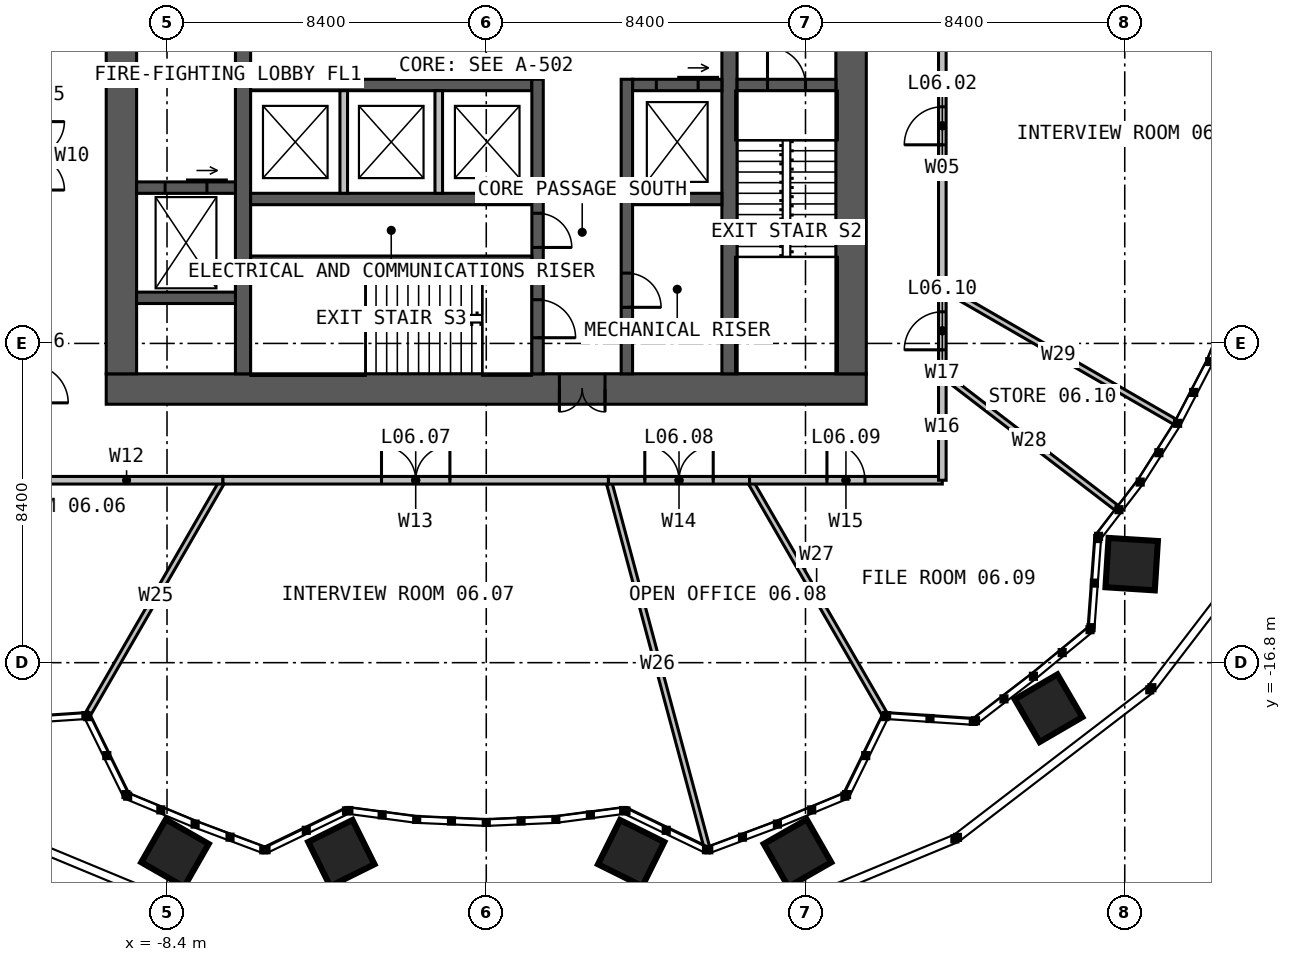
"""IFC4 building model, lengths in metres.
Left out: names, types, materials, properties, quantities, classifications, styles, units other than length and angle.
Written with IfcOpenShell. Run it as: python <this file> out.ifc"""

import sys

from ifc_helpers import new_model, si_unit, direction, frame, frame_2d, origin, place, context, subcontext, project, spatial, rectangle, extrude, element, fill, save


model = new_model("IFC4")
c1 = context("Model", 3, precision=1e-05, world=origin(), true_north=direction((0.0, 1.0)))
c2 = subcontext(c1, "Body", "Model", "MODEL_VIEW")
j1 = project(units=[si_unit("LENGTHUNIT", "METRE"), si_unit("PLANEANGLEUNIT", "RADIAN")], contexts=[c1])
p1 = place(None, origin())
s1 = spatial("IfcSite", under=j1, at=p1, CompositionType="ELEMENT")
p2 = place(p1, origin())
s2 = spatial("IfcBuilding", under=s1, at=p2, CompositionType="ELEMENT")
p3 = place(p2, frame((0.0, 0.0, 29.0)))
s3 = spatial("IfcBuildingStorey", under=s2, at=p3, CompositionType="ELEMENT", Elevation=29.0)
p4 = place(p3, frame((10.0, -9.6, 0.0), z_axis=(0.0, 0.0, 1.0), x_axis=(-1.0, 0.0, 0.0)))
e1 = element("IfcWall", 1, at=p4, inside=s3, PredefinedType="SOLIDWALL", context=c2, shape_type="SweptSolid", body=[
    extrude(rectangle(XDim=20.0, YDim=0.8, at=frame_2d((10.0, 0.0))), origin(), (0.0, 0.0, 1.0), 4.0),
])
p5 = place(p4, frame((6.875, 0.0, 0.0)))
e2 = element("IfcOpeningElement", 2, at=p5, cuts=e1, PredefinedType="OPENING", context=c2, shape_type="SweptSolid", body=[
    extrude(rectangle(XDim=1.2, YDim=2.2, at=frame_2d((0.6, 1.1))), frame((0.0, 0.41, 0.0), z_axis=(0.0, -1.0, 0.0), x_axis=(1.0, 0.0, 0.0)), (0.0, 0.0, 1.0), 0.82),
])
for number, where, z_axis, x_axis in (
    (3, (9.6, -9.2, 0.0), (0.0, 0.0, 1.0), (0.0, 1.0, 0.0)),
    (4, (-9.6, 9.2, 0.0), (0.0, 0.0, 1.0), (0.0, -1.0, 0.0)),
):
    element("IfcWall", number, at=place(p3, frame(where, z_axis=z_axis, x_axis=x_axis)), inside=s3, PredefinedType="SOLIDWALL", context=c2, shape_type="SweptSolid", body=[
        extrude(rectangle(XDim=18.4, YDim=0.8, at=frame_2d((9.2, 0.0))), origin(), (0.0, 0.0, 1.0), 4.0),
    ])
p6 = place(p3, frame((-6.4, -9.2, 0.0), z_axis=(0.0, 0.0, 1.0), x_axis=(0.0, 1.0, 0.0)))
e5 = element("IfcWall", 5, at=p6, inside=s3, PredefinedType="SOLIDWALL", context=c2, shape_type="SweptSolid", body=[
    extrude(rectangle(XDim=18.4, YDim=0.4, at=frame_2d((9.2, 0.0))), origin(), (0.0, 0.0, 1.0), 4.0),
])
p7 = place(p6, frame((8.7, 0.0, 0.0)))
e6 = element("IfcOpeningElement", 6, at=p7, cuts=e5, PredefinedType="OPENING", context=c2, shape_type="SweptSolid", body=[
    extrude(rectangle(XDim=1.0, YDim=2.2, at=frame_2d((0.5, 1.1))), frame((0.0, 0.21, 0.0), z_axis=(0.0, -1.0, 0.0), x_axis=(1.0, 0.0, 0.0)), (0.0, 0.0, 1.0), 0.42),
])
p8 = place(p3, frame((6.4, 9.2, 0.0), z_axis=(0.0, 0.0, 1.0), x_axis=(0.0, -1.0, 0.0)))
e7 = element("IfcWall", 7, at=p8, inside=s3, PredefinedType="SOLIDWALL", context=c2, shape_type="SweptSolid", body=[
    extrude(rectangle(XDim=18.4, YDim=0.4, at=frame_2d((9.2, 0.0))), origin(), (0.0, 0.0, 1.0), 4.0),
])
p9 = place(p8, frame((8.7, 0.0, 0.0)))
e8 = element("IfcOpeningElement", 8, at=p9, cuts=e7, PredefinedType="OPENING", context=c2, shape_type="SweptSolid", body=[
    extrude(rectangle(XDim=1.0, YDim=2.2, at=frame_2d((0.5, 1.1))), frame((0.0, 0.21, 0.0), z_axis=(0.0, -1.0, 0.0), x_axis=(1.0, 0.0, 0.0)), (0.0, 0.0, 1.0), 0.42),
])
p10 = place(p3, frame((-6.2, -1.6, 0.0), z_axis=(0.0, 0.0, 1.0), x_axis=(1.0, 0.0, 0.0)))
e9 = element("IfcWall", 9, at=p10, inside=s3, PredefinedType="SOLIDWALL", context=c2, shape_type="SweptSolid", body=[
    extrude(rectangle(XDim=7.4, YDim=0.3, at=frame_2d((3.7, 0.0))), origin(), (0.0, 0.0, 1.0), 4.0),
])
p11 = place(p3, frame((3.85, -1.6, 0.0), z_axis=(0.0, 0.0, 1.0), x_axis=(1.0, 0.0, 0.0)))
e10 = element("IfcWall", 10, at=p11, inside=s3, PredefinedType="SOLIDWALL", context=c2, shape_type="SweptSolid", body=[
    extrude(rectangle(XDim=2.35, YDim=0.3, at=frame_2d((1.175, 0.0))), origin(), (0.0, 0.0, 1.0), 4.0),
])
p12 = place(p11, frame((0.625, 0.0, 0.0)))
e11 = element("IfcOpeningElement", 11, at=p12, cuts=e10, PredefinedType="OPENING", context=c2, shape_type="SweptSolid", body=[
    extrude(rectangle(XDim=1.1, YDim=2.2, at=frame_2d((0.55, 1.1))), frame((0.0, 0.16, 0.0), z_axis=(0.0, -1.0, 0.0), x_axis=(1.0, 0.0, 0.0)), (0.0, 0.0, 1.0), 0.32),
])
p13 = place(p3, frame((-6.2, -4.6, 0.0), z_axis=(0.0, 0.0, 1.0), x_axis=(1.0, 0.0, 0.0)))
e12 = element("IfcWall", 12, at=p13, inside=s3, PredefinedType="SOLIDWALL", context=c2, shape_type="SweptSolid", body=[
    extrude(rectangle(XDim=7.4, YDim=0.3, at=frame_2d((3.7, 0.0))), origin(), (0.0, 0.0, 1.0), 4.0),
])
p14 = place(p3, frame((3.85, -4.6, 0.0), z_axis=(0.0, 0.0, 1.0), x_axis=(1.0, 0.0, 0.0)))
e13 = element("IfcWall", 13, at=p14, inside=s3, PredefinedType="SOLIDWALL", context=c2, shape_type="SweptSolid", body=[
    extrude(rectangle(XDim=2.35, YDim=0.3, at=frame_2d((1.175, 0.0))), origin(), (0.0, 0.0, 1.0), 4.0),
])
p15 = place(p3, frame((1.35, -1.45, 0.0), z_axis=(0.0, 0.0, 1.0), x_axis=(0.0, -1.0, 0.0)))
e14 = element("IfcWall", 14, at=p15, inside=s3, PredefinedType="SOLIDWALL", context=c2, shape_type="SweptSolid", body=[
    extrude(rectangle(XDim=7.75, YDim=0.3, at=frame_2d((3.875, 0.0))), origin(), (0.0, 0.0, 1.0), 4.0),
])
p16 = place(p15, frame((5.8, 0.0, 0.0)))
e15 = element("IfcOpeningElement", 15, at=p16, cuts=e14, PredefinedType="OPENING", context=c2, shape_type="SweptSolid", body=[
    extrude(rectangle(XDim=1.0, YDim=2.2, at=frame_2d((0.5, 1.1))), frame((0.0, 0.16, 0.0), z_axis=(0.0, -1.0, 0.0), x_axis=(1.0, 0.0, 0.0)), (0.0, 0.0, 1.0), 0.32),
])
p17 = place(p15, frame((3.525, 0.0, 0.0)))
e16 = element("IfcOpeningElement", 16, at=p17, cuts=e14, PredefinedType="OPENING", context=c2, shape_type="SweptSolid", body=[
    extrude(rectangle(XDim=0.9, YDim=2.2, at=frame_2d((0.45, 1.1))), frame((0.0, 0.16, 0.0), z_axis=(0.0, -1.0, 0.0), x_axis=(1.0, 0.0, 0.0)), (0.0, 0.0, 1.0), 0.32),
])
p18 = place(p3, frame((3.7, -1.45, 0.0), z_axis=(0.0, 0.0, 1.0), x_axis=(0.0, -1.0, 0.0)))
e17 = element("IfcWall", 17, at=p18, inside=s3, PredefinedType="SOLIDWALL", context=c2, shape_type="SweptSolid", body=[
    extrude(rectangle(XDim=7.75, YDim=0.3, at=frame_2d((3.875, 0.0))), origin(), (0.0, 0.0, 1.0), 4.0),
])
p19 = place(p18, frame((5.1, 0.0, 0.0)))
e18 = element("IfcOpeningElement", 18, at=p19, cuts=e17, PredefinedType="OPENING", context=c2, shape_type="SweptSolid", body=[
    extrude(rectangle(XDim=0.9, YDim=2.2, at=frame_2d((0.45, 1.1))), frame((0.0, 0.16, 0.0), z_axis=(0.0, -1.0, 0.0), x_axis=(1.0, 0.0, 0.0)), (0.0, 0.0, 1.0), 0.32),
])
p20 = place(p3, frame((-6.2, -6.2, 0.0), z_axis=(0.0, 0.0, 1.0), x_axis=(1.0, 0.0, 0.0)))
e19 = element("IfcWall", 19, at=p20, inside=s3, PredefinedType="SOLIDWALL", context=c2, shape_type="SweptSolid", body=[
    extrude(rectangle(XDim=7.4, YDim=0.2, at=frame_2d((3.7, 0.0))), origin(), (0.0, 0.0, 1.0), 4.0),
])
p21 = place(p3, frame((6.6, -1.6, 0.0), z_axis=(0.0, 0.0, 1.0), x_axis=(1.0, 0.0, 0.0)))
e20 = element("IfcWall", 20, at=p21, inside=s3, PredefinedType="SOLIDWALL", context=c2, shape_type="SweptSolid", body=[
    extrude(rectangle(XDim=2.6, YDim=0.3, at=frame_2d((1.3, 0.0))), origin(), (0.0, 0.0, 1.0), 4.0),
])
p22 = place(p21, frame((0.8, 0.0, 0.0)))
e21 = element("IfcOpeningElement", 21, at=p22, cuts=e20, PredefinedType="OPENING", context=c2, shape_type="SweptSolid", body=[
    extrude(rectangle(XDim=1.0, YDim=2.2, at=frame_2d((0.5, 1.1))), frame((0.0, 0.16, 0.0), z_axis=(0.0, -1.0, 0.0), x_axis=(1.0, 0.0, 0.0)), (0.0, 0.0, 1.0), 0.32),
])
p23 = place(p3, frame((-9.2, -4.3, 0.0), z_axis=(0.0, 0.0, 1.0), x_axis=(1.0, 0.0, 0.0)))
e22 = element("IfcWall", 22, at=p23, inside=s3, PredefinedType="SOLIDWALL", context=c2, shape_type="SweptSolid", body=[
    extrude(rectangle(XDim=2.6, YDim=0.3, at=frame_2d((1.3, 0.0))), origin(), (0.0, 0.0, 1.0), 4.0),
])
p24 = place(p23, frame((0.75, 0.0, 0.0)))
e23 = element("IfcOpeningElement", 23, at=p24, cuts=e22, PredefinedType="OPENING", context=c2, shape_type="SweptSolid", body=[
    extrude(rectangle(XDim=1.1, YDim=2.2, at=frame_2d((0.55, 1.1))), frame((0.0, 0.16, 0.0), z_axis=(0.0, -1.0, 0.0), x_axis=(1.0, 0.0, 0.0)), (0.0, 0.0, 1.0), 0.32),
])
p25 = place(p3, frame((-9.2, -7.2, 0.0), z_axis=(0.0, 0.0, 1.0), x_axis=(1.0, 0.0, 0.0)))
e24 = element("IfcWall", 24, at=p25, inside=s3, PredefinedType="SOLIDWALL", context=c2, shape_type="SweptSolid", body=[
    extrude(rectangle(XDim=2.6, YDim=0.3, at=frame_2d((1.3, 0.0))), origin(), (0.0, 0.0, 1.0), 4.0),
])
for number, where, z_axis, x_axis in (
    (25, (-3.75, -1.75, 0.0), (0.0, 0.0, 1.0), (0.0, -1.0, 0.0)),
    (26, (-1.25, -1.75, 0.0), (0.0, 0.0, 1.0), (0.0, -1.0, 0.0)),
):
    element("IfcWall", number, at=place(p3, frame(where, z_axis=z_axis, x_axis=x_axis)), inside=s3, PredefinedType="SOLIDWALL", context=c2, shape_type="SweptSolid", body=[
        extrude(rectangle(XDim=2.7, YDim=0.2, at=frame_2d((1.35, 0.0))), origin(), (0.0, 0.0, 1.0), 3.75),
    ])
for number, where, z_axis, x_axis in (
    (27, (12.0, -6.928, 0.0), (0.0, 0.0, 1.0), (0.866, -0.5, 0.0)),
    (28, (-6.928, -12.0, 0.0), (0.0, 0.0, 1.0), (-0.5, -0.866, 0.0)),
):
    element("IfcWall", number, at=place(p3, frame(where, z_axis=z_axis, x_axis=x_axis)), inside=s3, PredefinedType="PARTITIONING", context=c2, shape_type="SweptSolid", body=[
        extrude(rectangle(XDim=7.057, YDim=0.15, at=frame_2d((3.529, 0.0))), origin(), (0.0, 0.0, 1.0), 2.79),
    ])
p26 = place(p3, frame((3.215, -12.0, 0.0), z_axis=(0.0, 0.0, 1.0), x_axis=(0.258824874955, -0.965924264166, 0.0)))
e29 = element("IfcWall", 29, at=p26, inside=s3, PredefinedType="PARTITIONING", context=c2, shape_type="SweptSolid", body=[
    extrude(rectangle(XDim=9.987, YDim=0.15, at=frame_2d((4.994, 0.0))), origin(), (0.0, 0.0, 1.0), 2.79),
])
p27 = place(p3, frame((6.928, -12.0, 0.0), z_axis=(0.0, 0.0, 1.0), x_axis=(0.500004948271, -0.86602254688, 0.0)))
e30 = element("IfcWall", 30, at=p27, inside=s3, PredefinedType="PARTITIONING", context=c2, shape_type="SweptSolid", body=[
    extrude(rectangle(XDim=7.057, YDim=0.15, at=frame_2d((3.529, 0.0))), origin(), (0.0, 0.0, 1.0), 2.79),
])
p28 = place(p3, frame((12.0, -9.208, 0.0), z_axis=(0.0, 0.0, 1.0), x_axis=(0.793353539316, -0.608761169634, 0.0)))
e31 = element("IfcWall", 31, at=p28, inside=s3, PredefinedType="PARTITIONING", context=c2, shape_type="SweptSolid", body=[
    extrude(rectangle(XDim=5.768, YDim=0.15, at=frame_2d((2.884, 0.0))), origin(), (0.0, 0.0, 1.0), 2.79),
])
p29 = place(p3, frame((12.0, -6.928, 0.0), z_axis=(0.0, 0.0, 1.0), x_axis=(0.0, 1.0, 0.0)))
e32 = element("IfcWall", 32, at=p29, inside=s3, PredefinedType="PARTITIONING", context=c2, shape_type="SweptSolid", body=[
    extrude(rectangle(XDim=8.508, YDim=0.2, at=frame_2d((4.254, 0.0))), origin(), (0.0, 0.0, 1.0), 3.8),
])
p30 = place(p29, frame((3.754, 0.0, 0.0)))
e33 = element("IfcOpeningElement", 33, at=p30, cuts=e32, PredefinedType="OPENING", context=c2, shape_type="SweptSolid", body=[
    extrude(rectangle(XDim=1.0, YDim=2.2, at=frame_2d((0.5, 1.1))), frame((0.0, 0.11, 0.0), z_axis=(0.0, -1.0, 0.0), x_axis=(1.0, 0.0, 0.0)), (0.0, 0.0, 1.0), 0.22),
])
p31 = place(p3, frame((-12.0, -12.0, 0.0), z_axis=(0.0, 0.0, 1.0), x_axis=(1.0, 0.0, 0.0)))
e34 = element("IfcWall", 34, at=p31, inside=s3, PredefinedType="PARTITIONING", context=c2, shape_type="SweptSolid", body=[
    extrude(rectangle(XDim=5.072, YDim=0.2, at=frame_2d((2.536, 0.0))), origin(), (0.0, 0.0, 1.0), 3.8),
])
p32 = place(p3, frame((-6.928, -12.0, 0.0), z_axis=(0.0, 0.0, 1.0), x_axis=(1.0, 0.0, 0.0)))
e35 = element("IfcWall", 35, at=p32, inside=s3, PredefinedType="PARTITIONING", context=c2, shape_type="SweptSolid", body=[
    extrude(rectangle(XDim=10.144, YDim=0.2, at=frame_2d((5.072, 0.0))), origin(), (0.0, 0.0, 1.0), 3.8),
])
p33 = place(p32, frame((4.172, 0.0, 0.0)))
e36 = element("IfcOpeningElement", 36, at=p33, cuts=e35, PredefinedType="OPENING", context=c2, shape_type="SweptSolid", body=[
    extrude(rectangle(XDim=1.8, YDim=2.2, at=frame_2d((0.9, 1.1))), frame((0.0, 0.11, 0.0), z_axis=(0.0, -1.0, 0.0), x_axis=(1.0, 0.0, 0.0)), (0.0, 0.0, 1.0), 0.22),
])
p34 = place(p3, frame((3.215, -12.0, 0.0), z_axis=(0.0, 0.0, 1.0), x_axis=(1.0, 0.0, 0.0)))
e37 = element("IfcWall", 37, at=p34, inside=s3, PredefinedType="PARTITIONING", context=c2, shape_type="SweptSolid", body=[
    extrude(rectangle(XDim=3.713, YDim=0.2, at=frame_2d((1.856, 0.0))), origin(), (0.0, 0.0, 1.0), 3.8),
])
p35 = place(p34, frame((0.956, 0.0, 0.0)))
e38 = element("IfcOpeningElement", 38, at=p35, cuts=e37, PredefinedType="OPENING", context=c2, shape_type="SweptSolid", body=[
    extrude(rectangle(XDim=1.8, YDim=2.2, at=frame_2d((0.9, 1.1))), frame((0.0, 0.11, 0.0), z_axis=(0.0, -1.0, 0.0), x_axis=(1.0, 0.0, 0.0)), (0.0, 0.0, 1.0), 0.22),
])
p36 = place(p3, frame((6.928, -12.0, 0.0), z_axis=(0.0, 0.0, 1.0), x_axis=(1.0, 0.0, 0.0)))
e39 = element("IfcWall", 39, at=p36, inside=s3, PredefinedType="PARTITIONING", context=c2, shape_type="SweptSolid", body=[
    extrude(rectangle(XDim=5.072, YDim=0.2, at=frame_2d((2.536, 0.0))), origin(), (0.0, 0.0, 1.0), 3.8),
])
p37 = place(p36, frame((2.036, 0.0, 0.0)))
e40 = element("IfcOpeningElement", 40, at=p37, cuts=e39, PredefinedType="OPENING", context=c2, shape_type="SweptSolid", body=[
    extrude(rectangle(XDim=1.0, YDim=2.2, at=frame_2d((0.5, 1.1))), frame((0.0, 0.11, 0.0), z_axis=(0.0, -1.0, 0.0), x_axis=(1.0, 0.0, 0.0)), (0.0, 0.0, 1.0), 0.22),
])
p38 = place(p3, frame((12.0, -12.0, 0.0), z_axis=(0.0, 0.0, 1.0), x_axis=(0.0, 1.0, 0.0)))
e41 = element("IfcWall", 41, at=p38, inside=s3, PredefinedType="PARTITIONING", context=c2, shape_type="SweptSolid", body=[
    extrude(rectangle(XDim=2.792, YDim=0.2, at=frame_2d((1.396, 0.0))), origin(), (0.0, 0.0, 1.0), 3.8),
])
p39 = place(p3, frame((12.0, -9.208, 0.0), z_axis=(0.0, 0.0, 1.0), x_axis=(0.0, 1.0, 0.0)))
e42 = element("IfcWall", 42, at=p39, inside=s3, PredefinedType="PARTITIONING", context=c2, shape_type="SweptSolid", body=[
    extrude(rectangle(XDim=2.28, YDim=0.2, at=frame_2d((1.14, 0.0))), origin(), (0.0, 0.0, 1.0), 3.8),
])
p40 = place(p39, frame((0.64, 0.0, 0.0)))
e43 = element("IfcOpeningElement", 43, at=p40, cuts=e42, PredefinedType="OPENING", context=c2, shape_type="SweptSolid", body=[
    extrude(rectangle(XDim=1.0, YDim=2.2, at=frame_2d((0.5, 1.1))), frame((0.0, 0.11, 0.0), z_axis=(0.0, -1.0, 0.0), x_axis=(1.0, 0.0, 0.0)), (0.0, 0.0, 1.0), 0.22),
])
p41 = place(p5, origin())
e44 = element("IfcDoor", 44, at=p41, inside=s3, OperationType="DOUBLE_DOOR_SINGLE_SWING", PredefinedType="DOOR", context=c2, shape_type="SweptSolid", body=[
    extrude(rectangle(XDim=1.2, YDim=2.2, at=frame_2d((0.6, 1.1))), frame((0.0, 0.025, 0.0), z_axis=(0.0, -1.0, 0.0), x_axis=(1.0, 0.0, 0.0)), (0.0, 0.0, 1.0), 0.05),
])
fill(e2, e44)
p42 = place(p22, origin())
e45 = element("IfcDoor", 45, at=p42, inside=s3, OperationType="SINGLE_SWING_LEFT", PredefinedType="DOOR", context=c2, shape_type="SweptSolid", body=[
    extrude(rectangle(XDim=1.0, YDim=2.2, at=frame_2d((0.5, 1.1))), frame((0.0, 0.025, 0.0), z_axis=(0.0, -1.0, 0.0), x_axis=(1.0, 0.0, 0.0)), (0.0, 0.0, 1.0), 0.05),
])
fill(e21, e45)
p43 = place(p16, origin())
e46 = element("IfcDoor", 46, at=p43, inside=s3, OperationType="SINGLE_SWING_RIGHT", PredefinedType="DOOR", context=c2, shape_type="SweptSolid", body=[
    extrude(rectangle(XDim=1.0, YDim=2.2, at=frame_2d((0.5, 1.1))), frame((0.0, 0.025, 0.0), z_axis=(0.0, -1.0, 0.0), x_axis=(1.0, 0.0, 0.0)), (0.0, 0.0, 1.0), 0.05),
])
fill(e15, e46)
p44 = place(p17, origin())
e47 = element("IfcDoor", 47, at=p44, inside=s3, OperationType="SINGLE_SWING_RIGHT", PredefinedType="DOOR", context=c2, shape_type="SweptSolid", body=[
    extrude(rectangle(XDim=0.9, YDim=2.2, at=frame_2d((0.45, 1.1))), frame((0.0, 0.025, 0.0), z_axis=(0.0, -1.0, 0.0), x_axis=(1.0, 0.0, 0.0)), (0.0, 0.0, 1.0), 0.05),
])
fill(e16, e47)
p45 = place(p19, origin())
e48 = element("IfcDoor", 48, at=p45, inside=s3, OperationType="SINGLE_SWING_RIGHT", PredefinedType="DOOR", context=c2, shape_type="SweptSolid", body=[
    extrude(rectangle(XDim=0.9, YDim=2.2, at=frame_2d((0.45, 1.1))), frame((0.0, 0.025, 0.0), z_axis=(0.0, -1.0, 0.0), x_axis=(1.0, 0.0, 0.0)), (0.0, 0.0, 1.0), 0.05),
])
fill(e18, e48)
p46 = place(p12, origin())
e49 = element("IfcDoor", 49, at=p46, inside=s3, OperationType="SLIDING_TO_LEFT", PredefinedType="DOOR", context=c2, shape_type="SweptSolid", body=[
    extrude(rectangle(XDim=1.1, YDim=2.2, at=frame_2d((0.55, 1.1))), frame((0.0, 0.025, 0.0), z_axis=(0.0, -1.0, 0.0), x_axis=(1.0, 0.0, 0.0)), (0.0, 0.0, 1.0), 0.05),
])
fill(e11, e49)
p47 = place(p24, origin())
e50 = element("IfcDoor", 50, at=p47, inside=s3, OperationType="SLIDING_TO_LEFT", PredefinedType="DOOR", context=c2, shape_type="SweptSolid", body=[
    extrude(rectangle(XDim=1.1, YDim=2.2, at=frame_2d((0.55, 1.1))), frame((0.0, 0.025, 0.0), z_axis=(0.0, -1.0, 0.0), x_axis=(1.0, 0.0, 0.0)), (0.0, 0.0, 1.0), 0.05),
])
fill(e23, e50)
p48 = place(p30, origin())
e51 = element("IfcDoor", 51, at=p48, inside=s3, OperationType="SINGLE_SWING_LEFT", PredefinedType="DOOR", context=c2, shape_type="SweptSolid", body=[
    extrude(rectangle(XDim=1.0, YDim=2.2, at=frame_2d((0.5, 1.1))), frame((0.0, 0.025, 0.0), z_axis=(0.0, -1.0, 0.0), x_axis=(1.0, 0.0, 0.0)), (0.0, 0.0, 1.0), 0.05),
])
fill(e33, e51)
p49 = place(p33, origin())
e52 = element("IfcDoor", 52, at=p49, inside=s3, OperationType="DOUBLE_DOOR_SINGLE_SWING", PredefinedType="DOOR", context=c2, shape_type="SweptSolid", body=[
    extrude(rectangle(XDim=1.8, YDim=2.2, at=frame_2d((0.9, 1.1))), frame((0.0, 0.025, 0.0), z_axis=(0.0, -1.0, 0.0), x_axis=(1.0, 0.0, 0.0)), (0.0, 0.0, 1.0), 0.05),
])
fill(e36, e52)
p50 = place(p35, origin())
e53 = element("IfcDoor", 53, at=p50, inside=s3, OperationType="DOUBLE_DOOR_SINGLE_SWING", PredefinedType="DOOR", context=c2, shape_type="SweptSolid", body=[
    extrude(rectangle(XDim=1.8, YDim=2.2, at=frame_2d((0.9, 1.1))), frame((0.0, 0.025, 0.0), z_axis=(0.0, -1.0, 0.0), x_axis=(1.0, 0.0, 0.0)), (0.0, 0.0, 1.0), 0.05),
])
fill(e38, e53)
p51 = place(p37, origin())
e54 = element("IfcDoor", 54, at=p51, inside=s3, OperationType="SINGLE_SWING_LEFT", PredefinedType="DOOR", context=c2, shape_type="SweptSolid", body=[
    extrude(rectangle(XDim=1.0, YDim=2.2, at=frame_2d((0.5, 1.1))), frame((0.0, 0.025, 0.0), z_axis=(0.0, -1.0, 0.0), x_axis=(1.0, 0.0, 0.0)), (0.0, 0.0, 1.0), 0.05),
])
fill(e40, e54)
p52 = place(p40, origin())
e55 = element("IfcDoor", 55, at=p52, inside=s3, OperationType="SINGLE_SWING_LEFT", PredefinedType="DOOR", context=c2, shape_type="SweptSolid", body=[
    extrude(rectangle(XDim=1.0, YDim=2.2, at=frame_2d((0.5, 1.1))), frame((0.0, 0.025, 0.0), z_axis=(0.0, -1.0, 0.0), x_axis=(1.0, 0.0, 0.0)), (0.0, 0.0, 1.0), 0.05),
])
fill(e43, e55)
save(model, sys.argv[1])
